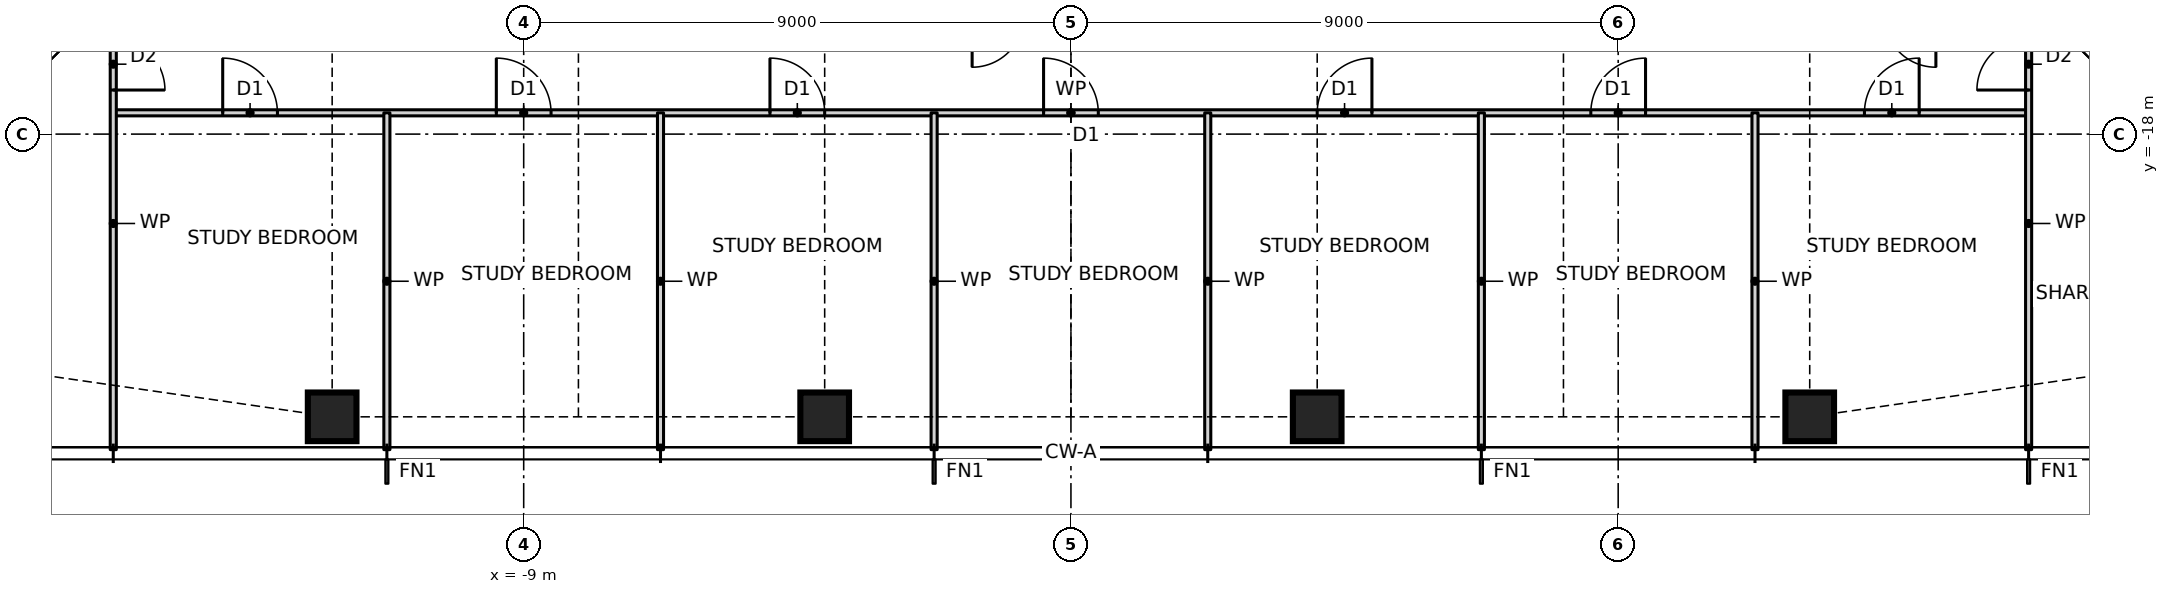
"""IFC4 building model, lengths in metres.
Left out: names, types, materials, properties, quantities, classifications, styles, units other than length and angle.
Written with IfcOpenShell. Run it as: python <this file> out.ifc"""

import sys

from ifc_helpers import new_model, si_unit, direction, frame, frame_2d, origin, origin_2d, place, context, subcontext, project, spatial, rectangle, hollow_rectangle, extrude, element, fill, save


model = new_model("IFC4")
c1 = context("Model", 3, precision=1e-05, world=origin(), true_north=direction((0.0, 1.0)))
c2 = subcontext(c1, "Body", "Model", "MODEL_VIEW")
j1 = project(units=[si_unit("LENGTHUNIT", "METRE"), si_unit("PLANEANGLEUNIT", "RADIAN")], contexts=[c1])
p1 = place(None, origin())
s1 = spatial("IfcSite", under=j1, at=p1, CompositionType="ELEMENT")
p2 = place(p1, origin())
s2 = spatial("IfcBuilding", under=s1, at=p2, CompositionType="ELEMENT")
p3 = place(p2, frame((0.0, 0.0, 22.0)))
s3 = spatial("IfcBuildingStorey", under=s2, at=p3, CompositionType="ELEMENT", Elevation=22.0)
for number, where, z_axis, x_axis in (
    (1, (-12.15, -22.65, 0.0), (0.0, 0.0, 1.0), (1.0, 0.0, 0.0)),
    (2, (-4.05, -22.65, 0.0), (0.0, 0.0, 1.0), (1.0, 0.0, 0.0)),
    (3, (4.05, -22.65, 0.0), (0.0, 0.0, 1.0), (1.0, 0.0, 0.0)),
    (4, (12.15, -22.65, 0.0), (0.0, 0.0, 1.0), (1.0, 0.0, 0.0)),
):
    element("IfcColumn", number, at=place(p3, frame(where, z_axis=z_axis, x_axis=x_axis)), inside=s3, PredefinedType="COLUMN", context=c2, shape_type="SweptSolid", body=[
        extrude(hollow_rectangle(XDim=0.8, YDim=0.8, WallThickness=0.09, at=origin_2d()), origin(), (0.0, 0.0, 1.0), 3.5),
    ])
p4 = place(p3, frame((-15.75, -17.65, 0.0), z_axis=(0.0, 0.0, 1.0), x_axis=(1.0, 0.0, 0.0)))
e5 = element("IfcWall", 5, at=p4, inside=s3, PredefinedType="PARTITIONING", context=c2, shape_type="SweptSolid", body=[
    extrude(rectangle(XDim=31.5, YDim=0.1, at=frame_2d((15.75, 0.0))), origin(), (0.0, 0.0, 1.0), 3.27),
])
p5 = place(p4, frame((1.8, 0.0, 0.0)))
e6 = element("IfcOpeningElement", 6, at=p5, cuts=e5, PredefinedType="OPENING", context=c2, shape_type="SweptSolid", body=[
    extrude(rectangle(XDim=0.9, YDim=2.1, at=frame_2d((0.45, 1.05))), frame((0.0, 0.06, 0.0), z_axis=(0.0, -1.0, 0.0), x_axis=(1.0, 0.0, 0.0)), (0.0, 0.0, 1.0), 0.12),
])
p6 = place(p4, frame((6.3, 0.0, 0.0)))
e7 = element("IfcOpeningElement", 7, at=p6, cuts=e5, PredefinedType="OPENING", context=c2, shape_type="SweptSolid", body=[
    extrude(rectangle(XDim=0.9, YDim=2.1, at=frame_2d((0.45, 1.05))), frame((0.0, 0.06, 0.0), z_axis=(0.0, -1.0, 0.0), x_axis=(1.0, 0.0, 0.0)), (0.0, 0.0, 1.0), 0.12),
])
p7 = place(p4, frame((10.8, 0.0, 0.0)))
e8 = element("IfcOpeningElement", 8, at=p7, cuts=e5, PredefinedType="OPENING", context=c2, shape_type="SweptSolid", body=[
    extrude(rectangle(XDim=0.9, YDim=2.1, at=frame_2d((0.45, 1.05))), frame((0.0, 0.06, 0.0), z_axis=(0.0, -1.0, 0.0), x_axis=(1.0, 0.0, 0.0)), (0.0, 0.0, 1.0), 0.12),
])
p8 = place(p4, frame((15.3, 0.0, 0.0)))
e9 = element("IfcOpeningElement", 9, at=p8, cuts=e5, PredefinedType="OPENING", context=c2, shape_type="SweptSolid", body=[
    extrude(rectangle(XDim=0.9, YDim=2.1, at=frame_2d((0.45, 1.05))), frame((0.0, 0.06, 0.0), z_axis=(0.0, -1.0, 0.0), x_axis=(1.0, 0.0, 0.0)), (0.0, 0.0, 1.0), 0.12),
])
p9 = place(p4, frame((19.8, 0.0, 0.0)))
e10 = element("IfcOpeningElement", 10, at=p9, cuts=e5, PredefinedType="OPENING", context=c2, shape_type="SweptSolid", body=[
    extrude(rectangle(XDim=0.9, YDim=2.1, at=frame_2d((0.45, 1.05))), frame((0.0, 0.06, 0.0), z_axis=(0.0, -1.0, 0.0), x_axis=(1.0, 0.0, 0.0)), (0.0, 0.0, 1.0), 0.12),
])
p10 = place(p4, frame((24.3, 0.0, 0.0)))
e11 = element("IfcOpeningElement", 11, at=p10, cuts=e5, PredefinedType="OPENING", context=c2, shape_type="SweptSolid", body=[
    extrude(rectangle(XDim=0.9, YDim=2.1, at=frame_2d((0.45, 1.05))), frame((0.0, 0.06, 0.0), z_axis=(0.0, -1.0, 0.0), x_axis=(1.0, 0.0, 0.0)), (0.0, 0.0, 1.0), 0.12),
])
p11 = place(p4, frame((28.8, 0.0, 0.0)))
e12 = element("IfcOpeningElement", 12, at=p11, cuts=e5, PredefinedType="OPENING", context=c2, shape_type="SweptSolid", body=[
    extrude(rectangle(XDim=0.9, YDim=2.1, at=frame_2d((0.45, 1.05))), frame((0.0, 0.06, 0.0), z_axis=(0.0, -1.0, 0.0), x_axis=(1.0, 0.0, 0.0)), (0.0, 0.0, 1.0), 0.12),
])
p12 = place(p3, frame((15.75, -23.19, 0.0), z_axis=(0.0, 0.0, 1.0), x_axis=(0.0, 1.0, 0.0)))
e13 = element("IfcWall", 13, at=p12, inside=s3, PredefinedType="PARTITIONING", context=c2, shape_type="SweptSolid", body=[
    extrude(rectangle(XDim=7.44, YDim=0.1, at=frame_2d((3.72, 0.0))), origin(), (0.0, 0.0, 1.0), 3.27),
])
p13 = place(p12, frame((5.915, 0.0, 0.0)))
e14 = element("IfcOpeningElement", 14, at=p13, cuts=e13, PredefinedType="OPENING", context=c2, shape_type="SweptSolid", body=[
    extrude(rectangle(XDim=0.85, YDim=2.1, at=frame_2d((0.425, 1.05))), frame((0.0, 0.06, 0.0), z_axis=(0.0, -1.0, 0.0), x_axis=(1.0, 0.0, 0.0)), (0.0, 0.0, 1.0), 0.12),
])
for number, where, z_axis, x_axis in (
    (15, (11.25, -23.19, 0.0), (0.0, 0.0, 1.0), (0.0, 1.0, 0.0)),
    (16, (6.75, -23.19, 0.0), (0.0, 0.0, 1.0), (0.0, 1.0, 0.0)),
    (17, (2.25, -23.19, 0.0), (0.0, 0.0, 1.0), (0.0, 1.0, 0.0)),
    (18, (-2.25, -23.19, 0.0), (0.0, 0.0, 1.0), (0.0, 1.0, 0.0)),
    (19, (-6.75, -23.19, 0.0), (0.0, 0.0, 1.0), (0.0, 1.0, 0.0)),
    (20, (-11.25, -23.19, 0.0), (0.0, 0.0, 1.0), (0.0, 1.0, 0.0)),
):
    element("IfcWall", number, at=place(p3, frame(where, z_axis=z_axis, x_axis=x_axis)), inside=s3, PredefinedType="PARTITIONING", context=c2, shape_type="SweptSolid", body=[
        extrude(rectangle(XDim=5.54, YDim=0.1, at=frame_2d((2.77, 0.0))), origin(), (0.0, 0.0, 1.0), 3.27),
    ])
p14 = place(p3, frame((-15.75, -23.19, 0.0), z_axis=(0.0, 0.0, 1.0), x_axis=(0.0, 1.0, 0.0)))
e21 = element("IfcWall", 21, at=p14, inside=s3, PredefinedType="PARTITIONING", context=c2, shape_type="SweptSolid", body=[
    extrude(rectangle(XDim=7.44, YDim=0.1, at=frame_2d((3.72, 0.0))), origin(), (0.0, 0.0, 1.0), 3.27),
])
p15 = place(p14, frame((5.915, 0.0, 0.0)))
e22 = element("IfcOpeningElement", 22, at=p15, cuts=e21, PredefinedType="OPENING", context=c2, shape_type="SweptSolid", body=[
    extrude(rectangle(XDim=0.85, YDim=2.1, at=frame_2d((0.425, 1.05))), frame((0.0, 0.06, 0.0), z_axis=(0.0, -1.0, 0.0), x_axis=(1.0, 0.0, 0.0)), (0.0, 0.0, 1.0), 0.12),
])
p16 = place(p5, origin())
e23 = element("IfcDoor", 23, at=p16, inside=s3, OperationType="SINGLE_SWING_LEFT", PredefinedType="DOOR", context=c2, shape_type="SweptSolid", body=[
    extrude(rectangle(XDim=0.9, YDim=2.1, at=frame_2d((0.45, 1.05))), frame((0.0, 0.025, 0.0), z_axis=(0.0, -1.0, 0.0), x_axis=(1.0, 0.0, 0.0)), (0.0, 0.0, 1.0), 0.05),
])
fill(e6, e23)
p17 = place(p6, origin())
e24 = element("IfcDoor", 24, at=p17, inside=s3, OperationType="SINGLE_SWING_LEFT", PredefinedType="DOOR", context=c2, shape_type="SweptSolid", body=[
    extrude(rectangle(XDim=0.9, YDim=2.1, at=frame_2d((0.45, 1.05))), frame((0.0, 0.025, 0.0), z_axis=(0.0, -1.0, 0.0), x_axis=(1.0, 0.0, 0.0)), (0.0, 0.0, 1.0), 0.05),
])
fill(e7, e24)
p18 = place(p7, origin())
e25 = element("IfcDoor", 25, at=p18, inside=s3, OperationType="SINGLE_SWING_LEFT", PredefinedType="DOOR", context=c2, shape_type="SweptSolid", body=[
    extrude(rectangle(XDim=0.9, YDim=2.1, at=frame_2d((0.45, 1.05))), frame((0.0, 0.025, 0.0), z_axis=(0.0, -1.0, 0.0), x_axis=(1.0, 0.0, 0.0)), (0.0, 0.0, 1.0), 0.05),
])
fill(e8, e25)
p19 = place(p8, origin())
e26 = element("IfcDoor", 26, at=p19, inside=s3, OperationType="SINGLE_SWING_LEFT", PredefinedType="DOOR", context=c2, shape_type="SweptSolid", body=[
    extrude(rectangle(XDim=0.9, YDim=2.1, at=frame_2d((0.45, 1.05))), frame((0.0, 0.025, 0.0), z_axis=(0.0, -1.0, 0.0), x_axis=(1.0, 0.0, 0.0)), (0.0, 0.0, 1.0), 0.05),
])
fill(e9, e26)
p20 = place(p9, origin())
e27 = element("IfcDoor", 27, at=p20, inside=s3, OperationType="SINGLE_SWING_RIGHT", PredefinedType="DOOR", context=c2, shape_type="SweptSolid", body=[
    extrude(rectangle(XDim=0.9, YDim=2.1, at=frame_2d((0.45, 1.05))), frame((0.0, 0.025, 0.0), z_axis=(0.0, -1.0, 0.0), x_axis=(1.0, 0.0, 0.0)), (0.0, 0.0, 1.0), 0.05),
])
fill(e10, e27)
p21 = place(p10, origin())
e28 = element("IfcDoor", 28, at=p21, inside=s3, OperationType="SINGLE_SWING_RIGHT", PredefinedType="DOOR", context=c2, shape_type="SweptSolid", body=[
    extrude(rectangle(XDim=0.9, YDim=2.1, at=frame_2d((0.45, 1.05))), frame((0.0, 0.025, 0.0), z_axis=(0.0, -1.0, 0.0), x_axis=(1.0, 0.0, 0.0)), (0.0, 0.0, 1.0), 0.05),
])
fill(e11, e28)
p22 = place(p11, origin())
e29 = element("IfcDoor", 29, at=p22, inside=s3, OperationType="SINGLE_SWING_RIGHT", PredefinedType="DOOR", context=c2, shape_type="SweptSolid", body=[
    extrude(rectangle(XDim=0.9, YDim=2.1, at=frame_2d((0.45, 1.05))), frame((0.0, 0.025, 0.0), z_axis=(0.0, -1.0, 0.0), x_axis=(1.0, 0.0, 0.0)), (0.0, 0.0, 1.0), 0.05),
])
fill(e12, e29)
p23 = place(p15, frame((0.85, 0.0, 0.0), z_axis=(0.0, 0.0, 1.0), x_axis=(-1.0, 0.0, 0.0)))
e30 = element("IfcDoor", 30, at=p23, inside=s3, OperationType="SINGLE_SWING_RIGHT", PredefinedType="DOOR", context=c2, shape_type="SweptSolid", body=[
    extrude(rectangle(XDim=0.85, YDim=2.1, at=frame_2d((0.425, 1.05))), frame((0.0, 0.025, 0.0), z_axis=(0.0, -1.0, 0.0), x_axis=(1.0, 0.0, 0.0)), (0.0, 0.0, 1.0), 0.05),
])
fill(e22, e30)
p24 = place(p13, origin())
e31 = element("IfcDoor", 31, at=p24, inside=s3, OperationType="SINGLE_SWING_LEFT", PredefinedType="DOOR", context=c2, shape_type="SweptSolid", body=[
    extrude(rectangle(XDim=0.85, YDim=2.1, at=frame_2d((0.425, 1.05))), frame((0.0, 0.025, 0.0), z_axis=(0.0, -1.0, 0.0), x_axis=(1.0, 0.0, 0.0)), (0.0, 0.0, 1.0), 0.05),
])
fill(e14, e31)
save(model, sys.argv[1])
